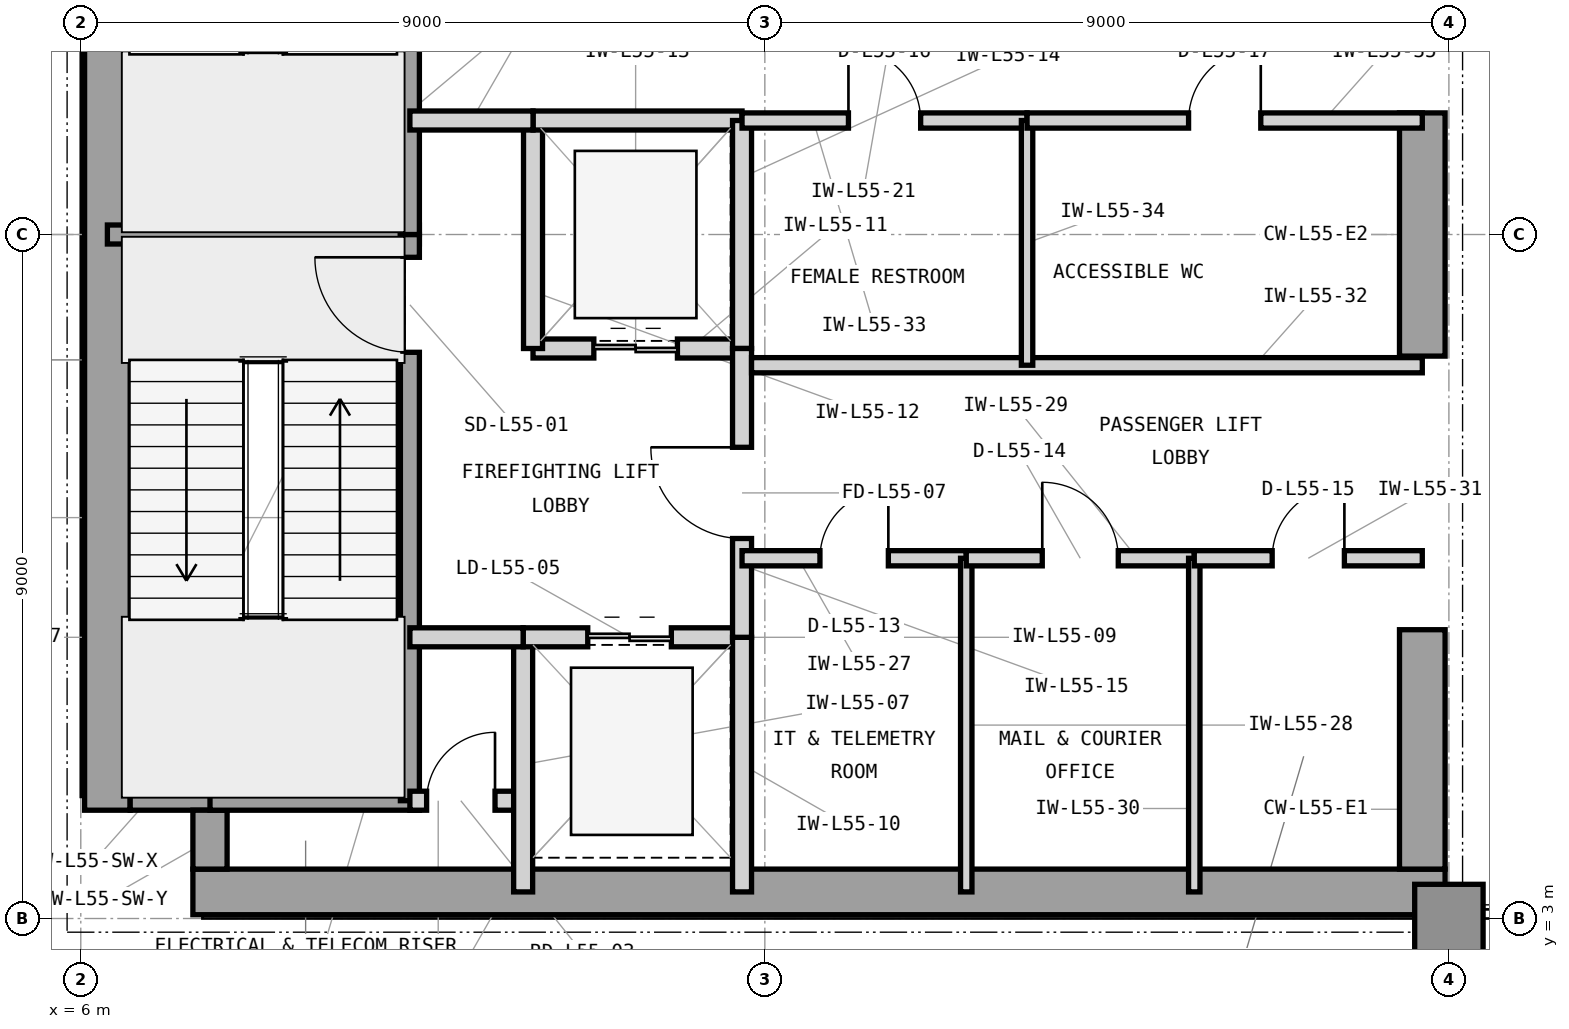
"""IFC4 building model, lengths in metres.
Left out: names, types, materials, properties, quantities, classifications, styles, units other than length and angle.
Written with IfcOpenShell. Run it as: python <this file> out.ifc"""

import sys

from ifc_helpers import new_model, si_unit, direction, frame, frame_2d, origin, origin_2d, place, context, subcontext, project, spatial, rectangle, extrude, element, fill, save


model = new_model("IFC4")
c1 = context("Model", 3, precision=1e-05, world=origin(), true_north=direction((0.0, 1.0)))
c2 = subcontext(c1, "Body", "Model", "MODEL_VIEW")
j1 = project(units=[si_unit("LENGTHUNIT", "METRE"), si_unit("PLANEANGLEUNIT", "RADIAN")], contexts=[c1])
p1 = place(None, origin())
s1 = spatial("IfcSite", under=j1, at=p1, CompositionType="ELEMENT")
p2 = place(p1, origin())
s2 = spatial("IfcBuilding", under=s1, at=p2, CompositionType="ELEMENT")
p3 = place(p2, frame((0.0, 0.0, 226.8)))
s3 = spatial("IfcBuildingStorey", under=s2, at=p3, CompositionType="ELEMENT", Elevation=226.8)
p4 = place(p3, frame((7.475, 3.35, 0.0), z_axis=(0.0, 0.0, 1.0), x_axis=(1.0, 0.0, 0.0)))
e1 = element("IfcWall", 1, at=p4, inside=s3, PredefinedType="SHEAR", context=c2, shape_type="SweptSolid", body=[
    extrude(rectangle(XDim=16.475, YDim=0.6, at=frame_2d((8.237, 0.0))), origin(), (0.0, 0.0, 1.0), 4.5),
])
p5 = place(p3, frame((6.35, 4.425, 0.0), z_axis=(0.0, 0.0, 1.0), x_axis=(0.0, 1.0, 0.0)))
e2 = element("IfcWall", 2, at=p5, inside=s3, PredefinedType="SHEAR", context=c2, shape_type="SweptSolid", body=[
    extrude(rectangle(XDim=15.15, YDim=0.6, at=frame_2d((7.575, 0.0))), origin(), (0.0, 0.0, 1.0), 4.5),
])
p6 = place(p3, frame((23.65, 3.65, 0.0), z_axis=(0.0, 0.0, 1.0), x_axis=(0.0, 1.0, 0.0)))
e3 = element("IfcWall", 3, at=p6, inside=s3, PredefinedType="SHEAR", context=c2, shape_type="SweptSolid", body=[
    extrude(rectangle(XDim=3.15, YDim=0.6, at=frame_2d((1.575, 0.0))), origin(), (0.0, 0.0, 1.0), 4.5),
])
p7 = place(p3, frame((23.65, 10.4, 0.0), z_axis=(0.0, 0.0, 1.0), x_axis=(0.0, 1.0, 0.0)))
e4 = element("IfcWall", 4, at=p7, inside=s3, PredefinedType="SHEAR", context=c2, shape_type="SweptSolid", body=[
    extrude(rectangle(XDim=3.2, YDim=0.6, at=frame_2d((1.6, 0.0))), origin(), (0.0, 0.0, 1.0), 4.5),
])
p8 = place(p3, frame((6.65, 4.65, 0.0), z_axis=(0.0, 0.0, 1.0), x_axis=(1.0, 0.0, 0.0)))
e5 = element("IfcWall", 5, at=p8, inside=s3, PredefinedType="SHEAR", context=c2, shape_type="SweptSolid", body=[
    extrude(rectangle(XDim=1.275, YDim=0.45, at=frame_2d((0.638, 0.0))), origin(), (0.0, 0.0, 1.0), 4.5),
])
p9 = place(p3, frame((7.7, 3.65, 0.0), z_axis=(0.0, 0.0, 1.0), x_axis=(0.0, 1.0, 0.0)))
e6 = element("IfcWall", 6, at=p9, inside=s3, PredefinedType="SHEAR", context=c2, shape_type="SweptSolid", body=[
    extrude(rectangle(XDim=0.775, YDim=0.45, at=frame_2d((0.388, 0.0))), origin(), (0.0, 0.0, 1.0), 4.5),
])
p10 = place(p3, frame((24.0, 3.0, 0.0), z_axis=(0.0, 0.0, 1.0), x_axis=(1.0, 0.0, 0.0)))
e7 = element("IfcColumn", 7, at=p10, inside=s3, PredefinedType="COLUMN", context=c2, shape_type="SweptSolid", body=[
    extrude(rectangle(XDim=0.9, YDim=0.9, at=origin_2d()), origin(), (0.0, 0.0, 1.0), 4.5),
])
p11 = place(p3, frame((6.35, 12.0, 0.0), z_axis=(0.0, 0.0, 1.0), x_axis=(1.0, 0.0, 0.0)))
e8 = element("IfcWall", 8, at=p11, inside=s3, PredefinedType="SHEAR", context=c2, shape_type="SweptSolid", body=[
    extrude(rectangle(XDim=4.105, YDim=0.25, at=frame_2d((2.052, 0.0))), origin(), (0.0, 0.0, 1.0), 4.5),
])
p12 = place(p3, frame((7.7, 4.55, 0.0), z_axis=(0.0, 0.0, 1.0), x_axis=(1.0, 0.0, 0.0)))
e9 = element("IfcWall", 9, at=p12, inside=s3, PredefinedType="SHEAR", context=c2, shape_type="SweptSolid", body=[
    extrude(rectangle(XDim=2.755, YDim=0.25, at=frame_2d((1.377, 0.0))), origin(), (0.0, 0.0, 1.0), 4.5),
])
p13 = place(p3, frame((10.33, 4.55, 0.0), z_axis=(0.0, 0.0, 1.0), x_axis=(0.0, 1.0, 0.0)))
e10 = element("IfcWall", 10, at=p13, inside=s3, PredefinedType="SHEAR", context=c2, shape_type="SweptSolid", body=[
    extrude(rectangle(XDim=7.45, YDim=0.25, at=frame_2d((3.725, 0.0))), origin(), (0.0, 0.0, 1.0), 4.5),
])
p14 = place(p13, frame((5.9, 0.0, 0.0)))
e11 = element("IfcOpeningElement", 11, at=p14, cuts=e10, PredefinedType="OPENING", context=c2, shape_type="SweptSolid", body=[
    extrude(rectangle(XDim=1.25, YDim=2.2, at=frame_2d((0.625, 1.1))), frame((0.0, 0.135, 0.0), z_axis=(0.0, -1.0, 0.0), x_axis=(1.0, 0.0, 0.0)), (0.0, 0.0, 1.0), 0.27),
])
p15 = place(p3, frame((10.33, 12.0, 0.0), z_axis=(0.0, 0.0, 1.0), x_axis=(0.0, 1.0, 0.0)))
e12 = element("IfcWall", 12, at=p15, inside=s3, PredefinedType="SHEAR", context=c2, shape_type="SweptSolid", body=[
    extrude(rectangle(XDim=7.45, YDim=0.25, at=frame_2d((3.725, 0.0))), origin(), (0.0, 0.0, 1.0), 4.5),
])
p16 = place(p15, frame((5.85, 0.0, 0.0)))
e13 = element("IfcOpeningElement", 13, at=p16, cuts=e12, PredefinedType="OPENING", context=c2, shape_type="SweptSolid", body=[
    extrude(rectangle(XDim=1.25, YDim=2.2, at=frame_2d((0.625, 1.1))), frame((0.0, 0.135, 0.0), z_axis=(0.0, -1.0, 0.0), x_axis=(1.0, 0.0, 0.0)), (0.0, 0.0, 1.0), 0.27),
])
p17 = place(p3, frame((10.33, 4.55, 0.0), z_axis=(0.0, 0.0, 1.0), x_axis=(1.0, 0.0, 0.0)))
e14 = element("IfcWall", 14, at=p17, inside=s3, PredefinedType="PARTITIONING", context=c2, shape_type="SweptSolid", body=[
    extrude(rectangle(XDim=1.49, YDim=0.25, at=frame_2d((0.745, 0.0))), origin(), (0.0, 0.0, 1.0), 4.29),
])
p18 = place(p17, frame((0.22, 0.0, 0.0)))
e15 = element("IfcOpeningElement", 15, at=p18, cuts=e14, PredefinedType="OPENING", context=c2, shape_type="SweptSolid", body=[
    extrude(rectangle(XDim=0.9, YDim=2.1, at=frame_2d((0.45, 1.05))), frame((0.0, 0.135, 0.0), z_axis=(0.0, -1.0, 0.0), x_axis=(1.0, 0.0, 0.0)), (0.0, 0.0, 1.0), 0.27),
])
p19 = place(p3, frame((11.82, 3.35, 0.0), z_axis=(0.0, 0.0, 1.0), x_axis=(0.0, 1.0, 0.0)))
e16 = element("IfcWall", 16, at=p19, inside=s3, PredefinedType="PARTITIONING", context=c2, shape_type="SweptSolid", body=[
    extrude(rectangle(XDim=3.35, YDim=0.25, at=frame_2d((1.675, 0.0))), origin(), (0.0, 0.0, 1.0), 4.29),
])
p20 = place(p3, frame((11.82, 6.7, 0.0), z_axis=(0.0, 0.0, 1.0), x_axis=(1.0, 0.0, 0.0)))
e17 = element("IfcWall", 17, at=p20, inside=s3, PredefinedType="PARTITIONING", context=c2, shape_type="SweptSolid", body=[
    extrude(rectangle(XDim=2.88, YDim=0.25, at=frame_2d((1.44, 0.0))), origin(), (0.0, 0.0, 1.0), 3.673),
])
p21 = place(p20, frame((0.85, 0.0, 0.0)))
e18 = element("IfcOpeningElement", 18, at=p21, cuts=e17, PredefinedType="OPENING", context=c2, shape_type="SweptSolid", body=[
    extrude(rectangle(XDim=1.1, YDim=2.25, at=frame_2d((0.55, 1.125))), frame((0.0, 0.135, 0.0), z_axis=(0.0, -1.0, 0.0), x_axis=(1.0, 0.0, 0.0)), (0.0, 0.0, 1.0), 0.27),
])
p22 = place(p3, frame((14.7, 3.35, 0.0), z_axis=(0.0, 0.0, 1.0), x_axis=(0.0, 1.0, 0.0)))
e19 = element("IfcWall", 19, at=p22, inside=s3, PredefinedType="PARTITIONING", context=c2, shape_type="SweptSolid", body=[
    extrude(rectangle(XDim=3.35, YDim=0.25, at=frame_2d((1.675, 0.0))), origin(), (0.0, 0.0, 1.0), 4.29),
])
p23 = place(p3, frame((11.95, 10.5, 0.0), z_axis=(0.0, 0.0, 1.0), x_axis=(1.0, 0.0, 0.0)))
e20 = element("IfcWall", 20, at=p23, inside=s3, PredefinedType="PARTITIONING", context=c2, shape_type="SweptSolid", body=[
    extrude(rectangle(XDim=2.75, YDim=0.25, at=frame_2d((1.375, 0.0))), origin(), (0.0, 0.0, 1.0), 3.673),
])
p24 = place(p23, frame((0.8, 0.0, 0.0)))
e21 = element("IfcOpeningElement", 21, at=p24, cuts=e20, PredefinedType="OPENING", context=c2, shape_type="SweptSolid", body=[
    extrude(rectangle(XDim=1.1, YDim=2.25, at=frame_2d((0.55, 1.125))), frame((0.0, 0.135, 0.0), z_axis=(0.0, -1.0, 0.0), x_axis=(1.0, 0.0, 0.0)), (0.0, 0.0, 1.0), 0.27),
])
p25 = place(p3, frame((11.95, 10.5, 0.0), z_axis=(0.0, 0.0, 1.0), x_axis=(0.0, 1.0, 0.0)))
e22 = element("IfcWall", 22, at=p25, inside=s3, PredefinedType="PARTITIONING", context=c2, shape_type="SweptSolid", body=[
    extrude(rectangle(XDim=3.0, YDim=0.25, at=frame_2d((1.5, 0.0))), origin(), (0.0, 0.0, 1.0), 4.29),
])
p26 = place(p3, frame((11.95, 13.5, 0.0), z_axis=(0.0, 0.0, 1.0), x_axis=(1.0, 0.0, 0.0)))
e23 = element("IfcWall", 23, at=p26, inside=s3, PredefinedType="PARTITIONING", context=c2, shape_type="SweptSolid", body=[
    extrude(rectangle(XDim=2.75, YDim=0.25, at=frame_2d((1.375, 0.0))), origin(), (0.0, 0.0, 1.0), 3.673),
])
p27 = place(p3, frame((14.7, 10.5, 0.0), z_axis=(0.0, 0.0, 1.0), x_axis=(0.0, 1.0, 0.0)))
e24 = element("IfcWall", 24, at=p27, inside=s3, PredefinedType="PARTITIONING", context=c2, shape_type="SweptSolid", body=[
    extrude(rectangle(XDim=3.0, YDim=0.25, at=frame_2d((1.5, 0.0))), origin(), (0.0, 0.0, 1.0), 4.29),
])
p28 = place(p3, frame((14.7, 6.7, 0.0), z_axis=(0.0, 0.0, 1.0), x_axis=(0.0, 1.0, 0.0)))
e25 = element("IfcWall", 25, at=p28, inside=s3, PredefinedType="PARTITIONING", context=c2, shape_type="SweptSolid", body=[
    extrude(rectangle(XDim=3.8, YDim=0.25, at=frame_2d((1.9, 0.0))), origin(), (0.0, 0.0, 1.0), 4.29),
])
p29 = place(p28, frame((1.3, 0.0, 0.0)))
e26 = element("IfcOpeningElement", 26, at=p29, cuts=e25, PredefinedType="OPENING", context=c2, shape_type="SweptSolid", body=[
    extrude(rectangle(XDim=1.2, YDim=2.2, at=frame_2d((0.6, 1.1))), frame((0.0, 0.135, 0.0), z_axis=(0.0, -1.0, 0.0), x_axis=(1.0, 0.0, 0.0)), (0.0, 0.0, 1.0), 0.27),
])
p30 = place(p3, frame((10.33, 13.5, 0.0), z_axis=(0.0, 0.0, 1.0), x_axis=(1.0, 0.0, 0.0)))
e27 = element("IfcWall", 27, at=p30, inside=s3, PredefinedType="PARTITIONING", context=c2, shape_type="SweptSolid", body=[
    extrude(rectangle(XDim=1.62, YDim=0.25, at=frame_2d((0.81, 0.0))), origin(), (0.0, 0.0, 1.0), 3.673),
])
p31 = place(p3, frame((10.33, 6.7, 0.0), z_axis=(0.0, 0.0, 1.0), x_axis=(1.0, 0.0, 0.0)))
e28 = element("IfcWall", 28, at=p31, inside=s3, PredefinedType="PARTITIONING", context=c2, shape_type="SweptSolid", body=[
    extrude(rectangle(XDim=1.49, YDim=0.25, at=frame_2d((0.745, 0.0))), origin(), (0.0, 0.0, 1.0), 3.673),
])
p32 = place(p3, frame((14.7, 7.74, 0.0), z_axis=(0.0, 0.0, 1.0), x_axis=(1.0, 0.0, 0.0)))
e29 = element("IfcWall", 29, at=p32, inside=s3, PredefinedType="PARTITIONING", context=c2, shape_type="SweptSolid", body=[
    extrude(rectangle(XDim=2.95, YDim=0.2, at=frame_2d((1.475, 0.0))), origin(), (0.0, 0.0, 1.0), 4.29),
])
p33 = place(p32, frame((1.025, 0.0, 0.0)))
e30 = element("IfcOpeningElement", 30, at=p33, cuts=e29, PredefinedType="OPENING", context=c2, shape_type="SweptSolid", body=[
    extrude(rectangle(XDim=0.9, YDim=2.1, at=frame_2d((0.45, 1.05))), frame((0.0, 0.11, 0.0), z_axis=(0.0, -1.0, 0.0), x_axis=(1.0, 0.0, 0.0)), (0.0, 0.0, 1.0), 0.22),
])
p34 = place(p3, frame((17.65, 3.35, 0.0), z_axis=(0.0, 0.0, 1.0), x_axis=(0.0, 1.0, 0.0)))
e31 = element("IfcWall", 31, at=p34, inside=s3, PredefinedType="PARTITIONING", context=c2, shape_type="SweptSolid", body=[
    extrude(rectangle(XDim=4.39, YDim=0.15, at=frame_2d((2.195, 0.0))), origin(), (0.0, 0.0, 1.0), 4.29),
])
p35 = place(p3, frame((17.65, 7.74, 0.0), z_axis=(0.0, 0.0, 1.0), x_axis=(1.0, 0.0, 0.0)))
e32 = element("IfcWall", 32, at=p35, inside=s3, PredefinedType="PARTITIONING", context=c2, shape_type="SweptSolid", body=[
    extrude(rectangle(XDim=3.0, YDim=0.2, at=frame_2d((1.5, 0.0))), origin(), (0.0, 0.0, 1.0), 4.29),
])
p36 = place(p35, frame((1.0, 0.0, 0.0)))
e33 = element("IfcOpeningElement", 33, at=p36, cuts=e32, PredefinedType="OPENING", context=c2, shape_type="SweptSolid", body=[
    extrude(rectangle(XDim=1.0, YDim=2.15, at=frame_2d((0.5, 1.075))), frame((0.0, 0.11, 0.0), z_axis=(0.0, -1.0, 0.0), x_axis=(1.0, 0.0, 0.0)), (0.0, 0.0, 1.0), 0.22),
])
p37 = place(p3, frame((20.65, 3.35, 0.0), z_axis=(0.0, 0.0, 1.0), x_axis=(0.0, 1.0, 0.0)))
e34 = element("IfcWall", 34, at=p37, inside=s3, PredefinedType="PARTITIONING", context=c2, shape_type="SweptSolid", body=[
    extrude(rectangle(XDim=4.39, YDim=0.15, at=frame_2d((2.195, 0.0))), origin(), (0.0, 0.0, 1.0), 4.29),
])
p38 = place(p3, frame((20.65, 7.74, 0.0), z_axis=(0.0, 0.0, 1.0), x_axis=(1.0, 0.0, 0.0)))
e35 = element("IfcWall", 35, at=p38, inside=s3, PredefinedType="PARTITIONING", context=c2, shape_type="SweptSolid", body=[
    extrude(rectangle(XDim=3.0, YDim=0.2, at=frame_2d((1.5, 0.0))), origin(), (0.0, 0.0, 1.0), 4.29),
])
p39 = place(p38, frame((1.025, 0.0, 0.0)))
e36 = element("IfcOpeningElement", 36, at=p39, cuts=e35, PredefinedType="OPENING", context=c2, shape_type="SweptSolid", body=[
    extrude(rectangle(XDim=0.95, YDim=2.1, at=frame_2d((0.475, 1.05))), frame((0.0, 0.11, 0.0), z_axis=(0.0, -1.0, 0.0), x_axis=(1.0, 0.0, 0.0)), (0.0, 0.0, 1.0), 0.22),
])
p40 = place(p3, frame((14.825, 10.28, 0.0), z_axis=(0.0, 0.0, 1.0), x_axis=(1.0, 0.0, 0.0)))
e37 = element("IfcWall", 37, at=p40, inside=s3, PredefinedType="PARTITIONING", context=c2, shape_type="SweptSolid", body=[
    extrude(rectangle(XDim=8.825, YDim=0.2, at=frame_2d((4.413, 0.0))), origin(), (0.0, 0.0, 1.0), 4.29),
])
p41 = place(p3, frame((14.7, 13.5, 0.0), z_axis=(0.0, 0.0, 1.0), x_axis=(1.0, 0.0, 0.0)))
e38 = element("IfcWall", 38, at=p41, inside=s3, PredefinedType="PARTITIONING", context=c2, shape_type="SweptSolid", body=[
    extrude(rectangle(XDim=3.75, YDim=0.2, at=frame_2d((1.875, 0.0))), origin(), (0.0, 0.0, 1.0), 3.673),
])
p42 = place(p41, frame((1.4, 0.0, 0.0)))
e39 = element("IfcOpeningElement", 39, at=p42, cuts=e38, PredefinedType="OPENING", context=c2, shape_type="SweptSolid", body=[
    extrude(rectangle(XDim=0.95, YDim=2.1, at=frame_2d((0.475, 1.05))), frame((0.0, 0.11, 0.0), z_axis=(0.0, -1.0, 0.0), x_axis=(1.0, 0.0, 0.0)), (0.0, 0.0, 1.0), 0.22),
])
p43 = place(p3, frame((18.45, 10.28, 0.0), z_axis=(0.0, 0.0, 1.0), x_axis=(0.0, 1.0, 0.0)))
e40 = element("IfcWall", 40, at=p43, inside=s3, PredefinedType="PARTITIONING", context=c2, shape_type="SweptSolid", body=[
    extrude(rectangle(XDim=3.22, YDim=0.15, at=frame_2d((1.61, 0.0))), origin(), (0.0, 0.0, 1.0), 4.29),
])
p44 = place(p3, frame((18.45, 13.5, 0.0), z_axis=(0.0, 0.0, 1.0), x_axis=(1.0, 0.0, 0.0)))
e41 = element("IfcWall", 41, at=p44, inside=s3, PredefinedType="PARTITIONING", context=c2, shape_type="SweptSolid", body=[
    extrude(rectangle(XDim=5.2, YDim=0.2, at=frame_2d((2.6, 0.0))), origin(), (0.0, 0.0, 1.0), 3.673),
])
p45 = place(p44, frame((2.125, 0.0, 0.0)))
e42 = element("IfcOpeningElement", 42, at=p45, cuts=e41, PredefinedType="OPENING", context=c2, shape_type="SweptSolid", body=[
    extrude(rectangle(XDim=0.95, YDim=2.1, at=frame_2d((0.475, 1.05))), frame((0.0, 0.11, 0.0), z_axis=(0.0, -1.0, 0.0), x_axis=(1.0, 0.0, 0.0)), (0.0, 0.0, 1.0), 0.22),
])
p46 = place(p14, origin())
e43 = element("IfcDoor", 43, at=p46, inside=s3, OperationType="SINGLE_SWING_RIGHT", PredefinedType="DOOR", context=c2, shape_type="SweptSolid", body=[
    extrude(rectangle(XDim=1.25, YDim=2.2, at=frame_2d((0.625, 1.1))), frame((0.0, 0.025, 0.0), z_axis=(0.0, -1.0, 0.0), x_axis=(1.0, 0.0, 0.0)), (0.0, 0.0, 1.0), 0.05),
])
fill(e11, e43)
p47 = place(p18, origin())
e44 = element("IfcDoor", 44, at=p47, inside=s3, OperationType="SINGLE_SWING_RIGHT", PredefinedType="TRAPDOOR", context=c2, shape_type="SweptSolid", body=[
    extrude(rectangle(XDim=0.9, YDim=2.1, at=frame_2d((0.45, 1.05))), frame((0.0, 0.025, 0.0), z_axis=(0.0, -1.0, 0.0), x_axis=(1.0, 0.0, 0.0)), (0.0, 0.0, 1.0), 0.05),
])
fill(e15, e44)
p48 = place(p21, origin())
e45 = element("IfcDoor", 45, at=p48, inside=s3, OperationType="DOUBLE_DOOR_SLIDING", PredefinedType="DOOR", context=c2, shape_type="SweptSolid", body=[
    extrude(rectangle(XDim=1.1, YDim=2.25, at=frame_2d((0.55, 1.125))), frame((0.0, 0.025, 0.0), z_axis=(0.0, -1.0, 0.0), x_axis=(1.0, 0.0, 0.0)), (0.0, 0.0, 1.0), 0.05),
])
fill(e18, e45)
p49 = place(p24, origin())
e46 = element("IfcDoor", 46, at=p49, inside=s3, OperationType="DOUBLE_DOOR_SLIDING", PredefinedType="DOOR", context=c2, shape_type="SweptSolid", body=[
    extrude(rectangle(XDim=1.1, YDim=2.25, at=frame_2d((0.55, 1.125))), frame((0.0, 0.025, 0.0), z_axis=(0.0, -1.0, 0.0), x_axis=(1.0, 0.0, 0.0)), (0.0, 0.0, 1.0), 0.05),
])
fill(e21, e46)
p50 = place(p29, origin())
e47 = element("IfcDoor", 47, at=p50, inside=s3, OperationType="SINGLE_SWING_RIGHT", PredefinedType="DOOR", context=c2, shape_type="SweptSolid", body=[
    extrude(rectangle(XDim=1.2, YDim=2.2, at=frame_2d((0.6, 1.1))), frame((0.0, 0.025, 0.0), z_axis=(0.0, -1.0, 0.0), x_axis=(1.0, 0.0, 0.0)), (0.0, 0.0, 1.0), 0.05),
])
fill(e26, e47)
p51 = place(p33, origin())
e48 = element("IfcDoor", 48, at=p51, inside=s3, OperationType="SINGLE_SWING_RIGHT", PredefinedType="TRAPDOOR", context=c2, shape_type="SweptSolid", body=[
    extrude(rectangle(XDim=0.9, YDim=2.1, at=frame_2d((0.45, 1.05))), frame((0.0, 0.025, 0.0), z_axis=(0.0, -1.0, 0.0), x_axis=(1.0, 0.0, 0.0)), (0.0, 0.0, 1.0), 0.05),
])
fill(e30, e48)
p52 = place(p36, origin())
e49 = element("IfcDoor", 49, at=p52, inside=s3, OperationType="SINGLE_SWING_LEFT", PredefinedType="DOOR", context=c2, shape_type="SweptSolid", body=[
    extrude(rectangle(XDim=1.0, YDim=2.15, at=frame_2d((0.5, 1.075))), frame((0.0, 0.025, 0.0), z_axis=(0.0, -1.0, 0.0), x_axis=(1.0, 0.0, 0.0)), (0.0, 0.0, 1.0), 0.05),
])
fill(e33, e49)
p53 = place(p39, origin())
e50 = element("IfcDoor", 50, at=p53, inside=s3, OperationType="SINGLE_SWING_RIGHT", PredefinedType="DOOR", context=c2, shape_type="SweptSolid", body=[
    extrude(rectangle(XDim=0.95, YDim=2.1, at=frame_2d((0.475, 1.05))), frame((0.0, 0.025, 0.0), z_axis=(0.0, -1.0, 0.0), x_axis=(1.0, 0.0, 0.0)), (0.0, 0.0, 1.0), 0.05),
])
fill(e36, e50)
p54 = place(p42, origin())
e51 = element("IfcDoor", 51, at=p54, inside=s3, OperationType="SINGLE_SWING_LEFT", PredefinedType="DOOR", context=c2, shape_type="SweptSolid", body=[
    extrude(rectangle(XDim=0.95, YDim=2.1, at=frame_2d((0.475, 1.05))), frame((0.0, 0.025, 0.0), z_axis=(0.0, -1.0, 0.0), x_axis=(1.0, 0.0, 0.0)), (0.0, 0.0, 1.0), 0.05),
])
fill(e39, e51)
p55 = place(p45, origin())
e52 = element("IfcDoor", 52, at=p55, inside=s3, OperationType="SINGLE_SWING_RIGHT", PredefinedType="DOOR", context=c2, shape_type="SweptSolid", body=[
    extrude(rectangle(XDim=0.95, YDim=2.1, at=frame_2d((0.475, 1.05))), frame((0.0, 0.025, 0.0), z_axis=(0.0, -1.0, 0.0), x_axis=(1.0, 0.0, 0.0)), (0.0, 0.0, 1.0), 0.05),
])
fill(e42, e52)
save(model, sys.argv[1])
